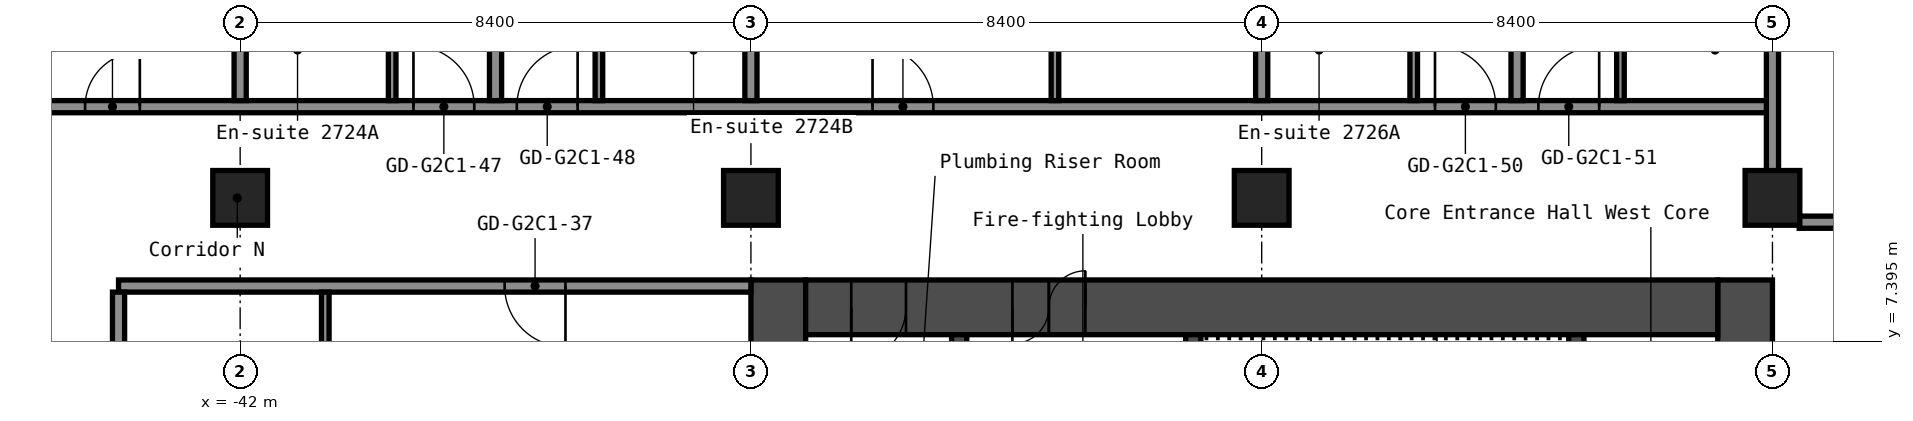
"""IFC4 building model, lengths in metres.
Left out: names, types, materials, properties, quantities, classifications, styles, units other than length and angle.
Written with IfcOpenShell. Run it as: python <this file> out.ifc"""

import sys

from ifc_helpers import new_model, si_unit, direction, frame, frame_2d, origin, origin_2d, place, context, subcontext, project, spatial, rectangle, hollow_rectangle, extrude, element, fill, save


model = new_model("IFC4")
c1 = context("Model", 3, precision=1e-05, world=origin(), true_north=direction((0.0, 1.0)))
c2 = subcontext(c1, "Body", "Model", "MODEL_VIEW")
j1 = project(units=[si_unit("LENGTHUNIT", "METRE"), si_unit("PLANEANGLEUNIT", "RADIAN")], contexts=[c1])
p1 = place(None, origin())
s1 = spatial("IfcSite", under=j1, at=p1, CompositionType="ELEMENT")
p2 = place(p1, origin())
s2 = spatial("IfcBuilding", under=s1, at=p2, CompositionType="ELEMENT")
p3 = place(p2, frame((0.0, 0.0, 97.8)))
s3 = spatial("IfcBuildingStorey", under=s2, at=p3, CompositionType="ELEMENT", Elevation=97.8)
for number, where, z_axis, x_axis in (
    (1, (-42.0, 9.75, 0.0), (0.0, 0.0, 1.0), (1.0, 0.0, 0.0)),
    (2, (-33.6, 9.75, 0.0), (0.0, 0.0, 1.0), (1.0, 0.0, 0.0)),
    (3, (-25.2, 9.75, 0.0), (0.0, 0.0, 1.0), (1.0, 0.0, 0.0)),
    (4, (-16.8, 9.75, 0.0), (0.0, 0.0, 1.0), (1.0, 0.0, 0.0)),
):
    element("IfcColumn", number, at=place(p3, frame(where, z_axis=z_axis, x_axis=x_axis)), inside=s3, PredefinedType="COLUMN", context=c2, shape_type="SweptSolid", body=[
        extrude(hollow_rectangle(XDim=0.9, YDim=0.9, WallThickness=0.036, at=origin_2d()), origin(), (0.0, 0.0, 1.0), 2.8),
    ])
p4 = place(p3, frame((-17.25, -8.4, 0.0), z_axis=(0.0, 0.0, 1.0), x_axis=(0.0, 1.0, 0.0)))
e5 = element("IfcWall", 5, at=p4, inside=s3, PredefinedType="SHEAR", context=c2, shape_type="SweptSolid", body=[
    extrude(rectangle(XDim=16.8, YDim=0.9, at=frame_2d((8.4, 0.0))), origin(), (0.0, 0.0, 1.0), 2.8),
])
p5 = place(p4, frame((7.6, 0.0, 0.0)))
e6 = element("IfcOpeningElement", 6, at=p5, cuts=e5, PredefinedType="OPENING", context=c2, shape_type="SweptSolid", body=[
    extrude(rectangle(XDim=1.2, YDim=2.1, at=frame_2d((0.6, 1.05))), frame((0.0, 0.46, 0.0), z_axis=(0.0, -1.0, 0.0), x_axis=(1.0, 0.0, 0.0)), (0.0, 0.0, 1.0), 0.92),
])
p6 = place(p3, frame((-33.15, -8.4, 0.0), z_axis=(0.0, 0.0, 1.0), x_axis=(0.0, 1.0, 0.0)))
e7 = element("IfcWall", 7, at=p6, inside=s3, PredefinedType="SHEAR", context=c2, shape_type="SweptSolid", body=[
    extrude(rectangle(XDim=16.8, YDim=0.9, at=frame_2d((8.4, 0.0))), origin(), (0.0, 0.0, 1.0), 2.8),
])
p7 = place(p3, frame((-32.7, 7.95, 0.0), z_axis=(0.0, 0.0, 1.0), x_axis=(1.0, 0.0, 0.0)))
e8 = element("IfcWall", 8, at=p7, inside=s3, PredefinedType="SHEAR", context=c2, shape_type="SweptSolid", body=[
    extrude(rectangle(XDim=15.0, YDim=0.9, at=frame_2d((7.5, 0.0))), origin(), (0.0, 0.0, 1.0), 2.8),
])
p8 = place(p7, frame((3.4, 0.0, 0.0)))
e9 = element("IfcOpeningElement", 9, at=p8, cuts=e8, PredefinedType="OPENING", context=c2, shape_type="SweptSolid", body=[
    extrude(rectangle(XDim=1.2, YDim=2.1, at=frame_2d((0.6, 1.05))), frame((0.0, 0.46, 0.0), z_axis=(0.0, -1.0, 0.0), x_axis=(1.0, 0.0, 0.0)), (0.0, 0.0, 1.0), 0.92),
])
p9 = place(p7, frame((0.75, 0.0, 0.0)))
e10 = element("IfcOpeningElement", 10, at=p9, cuts=e8, PredefinedType="OPENING", context=c2, shape_type="SweptSolid", body=[
    extrude(rectangle(XDim=0.9, YDim=2.1, at=frame_2d((0.45, 1.05))), frame((0.0, 0.46, 0.0), z_axis=(0.0, -1.0, 0.0), x_axis=(1.0, 0.0, 0.0)), (0.0, 0.0, 1.0), 0.92),
])
p10 = place(p3, frame((-20.025, 1.2, 0.0), z_axis=(0.0, 0.0, 1.0), x_axis=(0.0, 1.0, 0.0)))
e11 = element("IfcWall", 11, at=p10, inside=s3, PredefinedType="SHEAR", context=c2, shape_type="SweptSolid", body=[
    extrude(rectangle(XDim=6.3, YDim=0.25, at=frame_2d((3.15, 0.0))), origin(), (0.0, 0.0, 1.0), 2.8),
])
p11 = place(p3, frame((-26.325, 3.75, 0.0), z_axis=(0.0, 0.0, 1.0), x_axis=(0.0, 1.0, 0.0)))
e12 = element("IfcWall", 12, at=p11, inside=s3, PredefinedType="SHEAR", context=c2, shape_type="SweptSolid", body=[
    extrude(rectangle(XDim=3.75, YDim=0.25, at=frame_2d((1.875, 0.0))), origin(), (0.0, 0.0, 1.0), 2.8),
])
p12 = place(p11, frame((1.25, 0.0, 0.0)))
e13 = element("IfcOpeningElement", 13, at=p12, cuts=e12, PredefinedType="OPENING", context=c2, shape_type="SweptSolid", body=[
    extrude(rectangle(XDim=1.2, YDim=2.1, at=frame_2d((0.6, 1.05))), frame((0.0, 0.135, 0.0), z_axis=(0.0, -1.0, 0.0), x_axis=(1.0, 0.0, 0.0)), (0.0, 0.0, 1.0), 0.27),
])
p13 = place(p3, frame((-30.175, 1.45, 0.0), z_axis=(0.0, 0.0, 1.0), x_axis=(0.0, 1.0, 0.0)))
e14 = element("IfcWall", 14, at=p13, inside=s3, PredefinedType="SHEAR", context=c2, shape_type="SweptSolid", body=[
    extrude(rectangle(XDim=6.05, YDim=0.25, at=frame_2d((3.025, 0.0))), origin(), (0.0, 0.0, 1.0), 2.8),
])
p14 = place(p13, frame((2.625, 0.0, 0.0)))
e15 = element("IfcOpeningElement", 15, at=p14, cuts=e14, PredefinedType="OPENING", context=c2, shape_type="SweptSolid", body=[
    extrude(rectangle(XDim=1.1, YDim=2.1, at=frame_2d((0.55, 1.05))), frame((0.0, 0.135, 0.0), z_axis=(0.0, -1.0, 0.0), x_axis=(1.0, 0.0, 0.0)), (0.0, 0.0, 1.0), 0.27),
])
p15 = place(p3, frame((-44.0, 8.3, 0.0), z_axis=(0.0, 0.0, 1.0), x_axis=(1.0, 0.0, 0.0)))
e16 = element("IfcWall", 16, at=p15, inside=s3, PredefinedType="PARTITIONING", context=c2, shape_type="SweptSolid", body=[
    extrude(rectangle(XDim=10.4, YDim=0.2, at=frame_2d((5.2, 0.0))), origin(), (0.0, 0.0, 1.0), 2.8),
])
p16 = place(p15, frame((6.35, 0.0, 0.0)))
e17 = element("IfcOpeningElement", 17, at=p16, cuts=e16, PredefinedType="OPENING", context=c2, shape_type="SweptSolid", body=[
    extrude(rectangle(XDim=1.0, YDim=2.1, at=frame_2d((0.5, 1.05))), frame((0.0, 0.11, 0.0), z_axis=(0.0, -1.0, 0.0), x_axis=(1.0, 0.0, 0.0)), (0.0, 0.0, 1.0), 0.22),
])
p17 = place(p3, frame((-16.36, 9.35, 0.0), z_axis=(0.0, 0.0, 1.0), x_axis=(1.0, 0.0, 0.0)))
e18 = element("IfcWall", 18, at=p17, inside=s3, PredefinedType="PARTITIONING", context=c2, shape_type="SweptSolid", body=[
    extrude(rectangle(XDim=32.72, YDim=0.2, at=frame_2d((16.36, 0.0))), origin(), (0.0, 0.0, 1.0), 2.8),
])
p18 = place(p17, frame((1.56, 0.0, 0.0)))
e19 = element("IfcOpeningElement", 19, at=p18, cuts=e18, PredefinedType="OPENING", context=c2, shape_type="SweptSolid", body=[
    extrude(rectangle(XDim=1.0, YDim=2.1, at=frame_2d((0.5, 1.05))), frame((0.0, 0.11, 0.0), z_axis=(0.0, -1.0, 0.0), x_axis=(1.0, 0.0, 0.0)), (0.0, 0.0, 1.0), 0.22),
])
p19 = place(p17, frame((10.81, 0.0, 0.0)))
e20 = element("IfcOpeningElement", 20, at=p19, cuts=e18, PredefinedType="OPENING", context=c2, shape_type="SweptSolid", body=[
    extrude(rectangle(XDim=1.0, YDim=2.1, at=frame_2d((0.5, 1.05))), frame((0.0, 0.11, 0.0), z_axis=(0.0, -1.0, 0.0), x_axis=(1.0, 0.0, 0.0)), (0.0, 0.0, 1.0), 0.22),
])
p20 = place(p17, frame((12.51, 0.0, 0.0)))
e21 = element("IfcOpeningElement", 21, at=p20, cuts=e18, PredefinedType="OPENING", context=c2, shape_type="SweptSolid", body=[
    extrude(rectangle(XDim=1.0, YDim=2.1, at=frame_2d((0.5, 1.05))), frame((0.0, 0.11, 0.0), z_axis=(0.0, -1.0, 0.0), x_axis=(1.0, 0.0, 0.0)), (0.0, 0.0, 1.0), 0.22),
])
p21 = place(p17, frame((17.59, 0.0, 0.0)))
e22 = element("IfcOpeningElement", 22, at=p21, cuts=e18, PredefinedType="OPENING", context=c2, shape_type="SweptSolid", body=[
    extrude(rectangle(XDim=0.9, YDim=2.1, at=frame_2d((0.45, 1.05))), frame((0.0, 0.11, 0.0), z_axis=(0.0, -1.0, 0.0), x_axis=(1.0, 0.0, 0.0)), (0.0, 0.0, 1.0), 0.22),
])
p22 = place(p17, frame((21.79, 0.0, 0.0)))
e23 = element("IfcOpeningElement", 23, at=p22, cuts=e18, PredefinedType="OPENING", context=c2, shape_type="SweptSolid", body=[
    extrude(rectangle(XDim=0.9, YDim=2.1, at=frame_2d((0.45, 1.05))), frame((0.0, 0.11, 0.0), z_axis=(0.0, -1.0, 0.0), x_axis=(1.0, 0.0, 0.0)), (0.0, 0.0, 1.0), 0.22),
])
p23 = place(p17, frame((26.66, 0.0, 0.0)))
e24 = element("IfcOpeningElement", 24, at=p23, cuts=e18, PredefinedType="OPENING", context=c2, shape_type="SweptSolid", body=[
    extrude(rectangle(XDim=0.9, YDim=2.1, at=frame_2d((0.45, 1.05))), frame((0.0, 0.11, 0.0), z_axis=(0.0, -1.0, 0.0), x_axis=(1.0, 0.0, 0.0)), (0.0, 0.0, 1.0), 0.22),
])
p24 = place(p17, frame((30.86, 0.0, 0.0)))
e25 = element("IfcOpeningElement", 25, at=p24, cuts=e18, PredefinedType="OPENING", context=c2, shape_type="SweptSolid", body=[
    extrude(rectangle(XDim=0.9, YDim=2.1, at=frame_2d((0.45, 1.05))), frame((0.0, 0.11, 0.0), z_axis=(0.0, -1.0, 0.0), x_axis=(1.0, 0.0, 0.0)), (0.0, 0.0, 1.0), 0.22),
])
p25 = place(p3, frame((-46.5, 11.25, 0.0), z_axis=(0.0, 0.0, 1.0), x_axis=(1.0, 0.0, 0.0)))
e26 = element("IfcWall", 26, at=p25, inside=s3, PredefinedType="PARTITIONING", context=c2, shape_type="SweptSolid", body=[
    extrude(rectangle(XDim=29.7, YDim=0.2, at=frame_2d((14.85, 0.0))), origin(), (0.0, 0.0, 1.0), 2.8),
])
p26 = place(p25, frame((1.95, 0.0, 0.0)))
e27 = element("IfcOpeningElement", 27, at=p26, cuts=e26, PredefinedType="OPENING", context=c2, shape_type="SweptSolid", body=[
    extrude(rectangle(XDim=0.9, YDim=2.1, at=frame_2d((0.45, 1.05))), frame((0.0, 0.11, 0.0), z_axis=(0.0, -1.0, 0.0), x_axis=(1.0, 0.0, 0.0)), (0.0, 0.0, 1.0), 0.22),
])
p27 = place(p25, frame((7.35, 0.0, 0.0)))
e28 = element("IfcOpeningElement", 28, at=p27, cuts=e26, PredefinedType="OPENING", context=c2, shape_type="SweptSolid", body=[
    extrude(rectangle(XDim=1.0, YDim=2.1, at=frame_2d((0.5, 1.05))), frame((0.0, 0.11, 0.0), z_axis=(0.0, -1.0, 0.0), x_axis=(1.0, 0.0, 0.0)), (0.0, 0.0, 1.0), 0.22),
])
p28 = place(p25, frame((9.05, 0.0, 0.0)))
e29 = element("IfcOpeningElement", 29, at=p28, cuts=e26, PredefinedType="OPENING", context=c2, shape_type="SweptSolid", body=[
    extrude(rectangle(XDim=1.0, YDim=2.1, at=frame_2d((0.5, 1.05))), frame((0.0, 0.11, 0.0), z_axis=(0.0, -1.0, 0.0), x_axis=(1.0, 0.0, 0.0)), (0.0, 0.0, 1.0), 0.22),
])
p29 = place(p25, frame((14.9, 0.0, 0.0)))
e30 = element("IfcOpeningElement", 30, at=p29, cuts=e26, PredefinedType="OPENING", context=c2, shape_type="SweptSolid", body=[
    extrude(rectangle(XDim=1.0, YDim=2.1, at=frame_2d((0.5, 1.05))), frame((0.0, 0.11, 0.0), z_axis=(0.0, -1.0, 0.0), x_axis=(1.0, 0.0, 0.0)), (0.0, 0.0, 1.0), 0.22),
])
p30 = place(p25, frame((24.15, 0.0, 0.0)))
e31 = element("IfcOpeningElement", 31, at=p30, cuts=e26, PredefinedType="OPENING", context=c2, shape_type="SweptSolid", body=[
    extrude(rectangle(XDim=1.0, YDim=2.1, at=frame_2d((0.5, 1.05))), frame((0.0, 0.11, 0.0), z_axis=(0.0, -1.0, 0.0), x_axis=(1.0, 0.0, 0.0)), (0.0, 0.0, 1.0), 0.22),
])
p31 = place(p25, frame((25.85, 0.0, 0.0)))
e32 = element("IfcOpeningElement", 32, at=p31, cuts=e26, PredefinedType="OPENING", context=c2, shape_type="SweptSolid", body=[
    extrude(rectangle(XDim=1.0, YDim=2.1, at=frame_2d((0.5, 1.05))), frame((0.0, 0.11, 0.0), z_axis=(0.0, -1.0, 0.0), x_axis=(1.0, 0.0, 0.0)), (0.0, 0.0, 1.0), 0.22),
])
p32 = place(p3, frame((-44.0, -8.2, 0.0), z_axis=(0.0, 0.0, 1.0), x_axis=(0.0, 1.0, 0.0)))
e33 = element("IfcWall", 33, at=p32, inside=s3, PredefinedType="PARTITIONING", context=c2, shape_type="SweptSolid", body=[
    extrude(rectangle(XDim=16.4, YDim=0.2, at=frame_2d((8.2, 0.0))), origin(), (0.0, 0.0, 1.0), 2.8),
])
p33 = place(p3, frame((-42.0, 11.35, 0.0), z_axis=(0.0, 0.0, 1.0), x_axis=(0.0, 1.0, 0.0)))
e34 = element("IfcWall", 34, at=p33, inside=s3, PredefinedType="PARTITIONING", context=c2, shape_type="SweptSolid", body=[
    extrude(rectangle(XDim=12.2, YDim=0.2, at=frame_2d((6.1, 0.0))), origin(), (0.0, 0.0, 1.0), 2.8),
])
p34 = place(p3, frame((-40.6, 4.9, 0.0), z_axis=(0.0, 0.0, 1.0), x_axis=(0.0, 1.0, 0.0)))
e35 = element("IfcWall", 35, at=p34, inside=s3, PredefinedType="PARTITIONING", context=c2, shape_type="SweptSolid", body=[
    extrude(rectangle(XDim=3.3, YDim=0.125, at=frame_2d((1.65, 0.0))), origin(), (0.0, 0.0, 1.0), 2.8),
])
p35 = place(p3, frame((-39.5, 11.35, 0.0), z_axis=(0.0, 0.0, 1.0), x_axis=(0.0, 1.0, 0.0)))
e36 = element("IfcWall", 36, at=p35, inside=s3, PredefinedType="PARTITIONING", context=c2, shape_type="SweptSolid", body=[
    extrude(rectangle(XDim=2.9, YDim=0.125, at=frame_2d((1.45, 0.0))), origin(), (0.0, 0.0, 1.0), 2.8),
])
p36 = place(p35, frame((1.5, 0.0, 0.0)))
e37 = element("IfcOpeningElement", 37, at=p36, cuts=e36, PredefinedType="OPENING", context=c2, shape_type="SweptSolid", body=[
    extrude(rectangle(XDim=0.8, YDim=2.1, at=frame_2d((0.4, 1.05))), frame((0.0, 0.073, 0.0), z_axis=(0.0, -1.0, 0.0), x_axis=(1.0, 0.0, 0.0)), (0.0, 0.0, 1.0), 0.145),
])
p37 = place(p3, frame((-37.8, 11.35, 0.0), z_axis=(0.0, 0.0, 1.0), x_axis=(0.0, 1.0, 0.0)))
e38 = element("IfcWall", 38, at=p37, inside=s3, PredefinedType="PARTITIONING", context=c2, shape_type="SweptSolid", body=[
    extrude(rectangle(XDim=12.2, YDim=0.2, at=frame_2d((6.1, 0.0))), origin(), (0.0, 0.0, 1.0), 2.8),
])
p38 = place(p3, frame((-36.1, 11.35, 0.0), z_axis=(0.0, 0.0, 1.0), x_axis=(0.0, 1.0, 0.0)))
e39 = element("IfcWall", 39, at=p38, inside=s3, PredefinedType="PARTITIONING", context=c2, shape_type="SweptSolid", body=[
    extrude(rectangle(XDim=2.9, YDim=0.125, at=frame_2d((1.45, 0.0))), origin(), (0.0, 0.0, 1.0), 2.8),
])
p39 = place(p38, frame((1.5, 0.0, 0.0)))
e40 = element("IfcOpeningElement", 40, at=p39, cuts=e39, PredefinedType="OPENING", context=c2, shape_type="SweptSolid", body=[
    extrude(rectangle(XDim=0.8, YDim=2.1, at=frame_2d((0.4, 1.05))), frame((0.0, 0.073, 0.0), z_axis=(0.0, -1.0, 0.0), x_axis=(1.0, 0.0, 0.0)), (0.0, 0.0, 1.0), 0.145),
])
p40 = place(p3, frame((-33.6, 11.35, 0.0), z_axis=(0.0, 0.0, 1.0), x_axis=(0.0, 1.0, 0.0)))
e41 = element("IfcWall", 41, at=p40, inside=s3, PredefinedType="PARTITIONING", context=c2, shape_type="SweptSolid", body=[
    extrude(rectangle(XDim=12.2, YDim=0.2, at=frame_2d((6.1, 0.0))), origin(), (0.0, 0.0, 1.0), 2.8),
])
p41 = place(p3, frame((-28.6, 11.35, 0.0), z_axis=(0.0, 0.0, 1.0), x_axis=(0.0, 1.0, 0.0)))
e42 = element("IfcWall", 42, at=p41, inside=s3, PredefinedType="PARTITIONING", context=c2, shape_type="SweptSolid", body=[
    extrude(rectangle(XDim=3.3, YDim=0.125, at=frame_2d((1.65, 0.0))), origin(), (0.0, 0.0, 1.0), 2.8),
])
p42 = place(p3, frame((-25.2, 11.35, 0.0), z_axis=(0.0, 0.0, 1.0), x_axis=(0.0, 1.0, 0.0)))
e43 = element("IfcWall", 43, at=p42, inside=s3, PredefinedType="PARTITIONING", context=c2, shape_type="SweptSolid", body=[
    extrude(rectangle(XDim=12.2, YDim=0.2, at=frame_2d((6.1, 0.0))), origin(), (0.0, 0.0, 1.0), 2.8),
])
p43 = place(p3, frame((-22.7, 11.35, 0.0), z_axis=(0.0, 0.0, 1.0), x_axis=(0.0, 1.0, 0.0)))
e44 = element("IfcWall", 44, at=p43, inside=s3, PredefinedType="PARTITIONING", context=c2, shape_type="SweptSolid", body=[
    extrude(rectangle(XDim=2.9, YDim=0.125, at=frame_2d((1.45, 0.0))), origin(), (0.0, 0.0, 1.0), 2.8),
])
p44 = place(p43, frame((1.5, 0.0, 0.0)))
e45 = element("IfcOpeningElement", 45, at=p44, cuts=e44, PredefinedType="OPENING", context=c2, shape_type="SweptSolid", body=[
    extrude(rectangle(XDim=0.8, YDim=2.1, at=frame_2d((0.4, 1.05))), frame((0.0, 0.073, 0.0), z_axis=(0.0, -1.0, 0.0), x_axis=(1.0, 0.0, 0.0)), (0.0, 0.0, 1.0), 0.145),
])
p45 = place(p3, frame((-21.0, 11.35, 0.0), z_axis=(0.0, 0.0, 1.0), x_axis=(0.0, 1.0, 0.0)))
e46 = element("IfcWall", 46, at=p45, inside=s3, PredefinedType="PARTITIONING", context=c2, shape_type="SweptSolid", body=[
    extrude(rectangle(XDim=12.2, YDim=0.2, at=frame_2d((6.1, 0.0))), origin(), (0.0, 0.0, 1.0), 2.8),
])
p46 = place(p3, frame((-19.3, 11.35, 0.0), z_axis=(0.0, 0.0, 1.0), x_axis=(0.0, 1.0, 0.0)))
e47 = element("IfcWall", 47, at=p46, inside=s3, PredefinedType="PARTITIONING", context=c2, shape_type="SweptSolid", body=[
    extrude(rectangle(XDim=2.9, YDim=0.125, at=frame_2d((1.45, 0.0))), origin(), (0.0, 0.0, 1.0), 2.8),
])
p47 = place(p46, frame((1.5, 0.0, 0.0)))
e48 = element("IfcOpeningElement", 48, at=p47, cuts=e47, PredefinedType="OPENING", context=c2, shape_type="SweptSolid", body=[
    extrude(rectangle(XDim=0.8, YDim=2.1, at=frame_2d((0.4, 1.05))), frame((0.0, 0.073, 0.0), z_axis=(0.0, -1.0, 0.0), x_axis=(1.0, 0.0, 0.0)), (0.0, 0.0, 1.0), 0.145),
])
p48 = place(p3, frame((-16.8, 10.19, 0.0), z_axis=(0.0, 0.0, 1.0), x_axis=(0.0, 1.0, 0.0)))
e49 = element("IfcWall", 49, at=p48, inside=s3, PredefinedType="PARTITIONING", context=c2, shape_type="SweptSolid", body=[
    extrude(rectangle(XDim=13.36, YDim=0.2, at=frame_2d((6.68, 0.0))), origin(), (0.0, 0.0, 1.0), 2.8),
])
p49 = place(p8, origin())
e50 = element("IfcDoor", 50, at=p49, inside=s3, OperationType="DOUBLE_DOOR_SINGLE_SWING", PredefinedType="DOOR", context=c2, shape_type="SweptSolid", body=[
    extrude(rectangle(XDim=1.2, YDim=2.1, at=frame_2d((0.6, 1.05))), frame((0.0, 0.025, 0.0), z_axis=(0.0, -1.0, 0.0), x_axis=(1.0, 0.0, 0.0)), (0.0, 0.0, 1.0), 0.05),
])
fill(e9, e50)
p50 = place(p9, origin())
e51 = element("IfcDoor", 51, at=p50, inside=s3, OperationType="SINGLE_SWING_LEFT", PredefinedType="DOOR", context=c2, shape_type="SweptSolid", body=[
    extrude(rectangle(XDim=0.9, YDim=2.1, at=frame_2d((0.45, 1.05))), frame((0.0, 0.025, 0.0), z_axis=(0.0, -1.0, 0.0), x_axis=(1.0, 0.0, 0.0)), (0.0, 0.0, 1.0), 0.05),
])
fill(e10, e51)
p51 = place(p16, origin())
e52 = element("IfcDoor", 52, at=p51, inside=s3, OperationType="SINGLE_SWING_RIGHT", PredefinedType="DOOR", context=c2, shape_type="SweptSolid", body=[
    extrude(rectangle(XDim=1.0, YDim=2.1, at=frame_2d((0.5, 1.05))), frame((0.0, 0.025, 0.0), z_axis=(0.0, -1.0, 0.0), x_axis=(1.0, 0.0, 0.0)), (0.0, 0.0, 1.0), 0.05),
])
fill(e17, e52)
p52 = place(p26, origin())
e53 = element("IfcDoor", 53, at=p52, inside=s3, OperationType="SINGLE_SWING_LEFT", PredefinedType="DOOR", context=c2, shape_type="SweptSolid", body=[
    extrude(rectangle(XDim=0.9, YDim=2.1, at=frame_2d((0.45, 1.05))), frame((0.0, 0.025, 0.0), z_axis=(0.0, -1.0, 0.0), x_axis=(1.0, 0.0, 0.0)), (0.0, 0.0, 1.0), 0.05),
])
fill(e27, e53)
p53 = place(p27, origin())
e54 = element("IfcDoor", 54, at=p53, inside=s3, OperationType="SINGLE_SWING_RIGHT", PredefinedType="DOOR", context=c2, shape_type="SweptSolid", body=[
    extrude(rectangle(XDim=1.0, YDim=2.1, at=frame_2d((0.5, 1.05))), frame((0.0, 0.025, 0.0), z_axis=(0.0, -1.0, 0.0), x_axis=(1.0, 0.0, 0.0)), (0.0, 0.0, 1.0), 0.05),
])
fill(e28, e54)
p54 = place(p28, origin())
e55 = element("IfcDoor", 55, at=p54, inside=s3, OperationType="SINGLE_SWING_LEFT", PredefinedType="DOOR", context=c2, shape_type="SweptSolid", body=[
    extrude(rectangle(XDim=1.0, YDim=2.1, at=frame_2d((0.5, 1.05))), frame((0.0, 0.025, 0.0), z_axis=(0.0, -1.0, 0.0), x_axis=(1.0, 0.0, 0.0)), (0.0, 0.0, 1.0), 0.05),
])
fill(e29, e55)
p55 = place(p29, origin())
e56 = element("IfcDoor", 56, at=p55, inside=s3, OperationType="SINGLE_SWING_RIGHT", PredefinedType="DOOR", context=c2, shape_type="SweptSolid", body=[
    extrude(rectangle(XDim=1.0, YDim=2.1, at=frame_2d((0.5, 1.05))), frame((0.0, 0.025, 0.0), z_axis=(0.0, -1.0, 0.0), x_axis=(1.0, 0.0, 0.0)), (0.0, 0.0, 1.0), 0.05),
])
fill(e30, e56)
p56 = place(p30, origin())
e57 = element("IfcDoor", 57, at=p56, inside=s3, OperationType="SINGLE_SWING_RIGHT", PredefinedType="DOOR", context=c2, shape_type="SweptSolid", body=[
    extrude(rectangle(XDim=1.0, YDim=2.1, at=frame_2d((0.5, 1.05))), frame((0.0, 0.025, 0.0), z_axis=(0.0, -1.0, 0.0), x_axis=(1.0, 0.0, 0.0)), (0.0, 0.0, 1.0), 0.05),
])
fill(e31, e57)
p57 = place(p31, origin())
e58 = element("IfcDoor", 58, at=p57, inside=s3, OperationType="SINGLE_SWING_LEFT", PredefinedType="DOOR", context=c2, shape_type="SweptSolid", body=[
    extrude(rectangle(XDim=1.0, YDim=2.1, at=frame_2d((0.5, 1.05))), frame((0.0, 0.025, 0.0), z_axis=(0.0, -1.0, 0.0), x_axis=(1.0, 0.0, 0.0)), (0.0, 0.0, 1.0), 0.05),
])
fill(e32, e58)
save(model, sys.argv[1])
